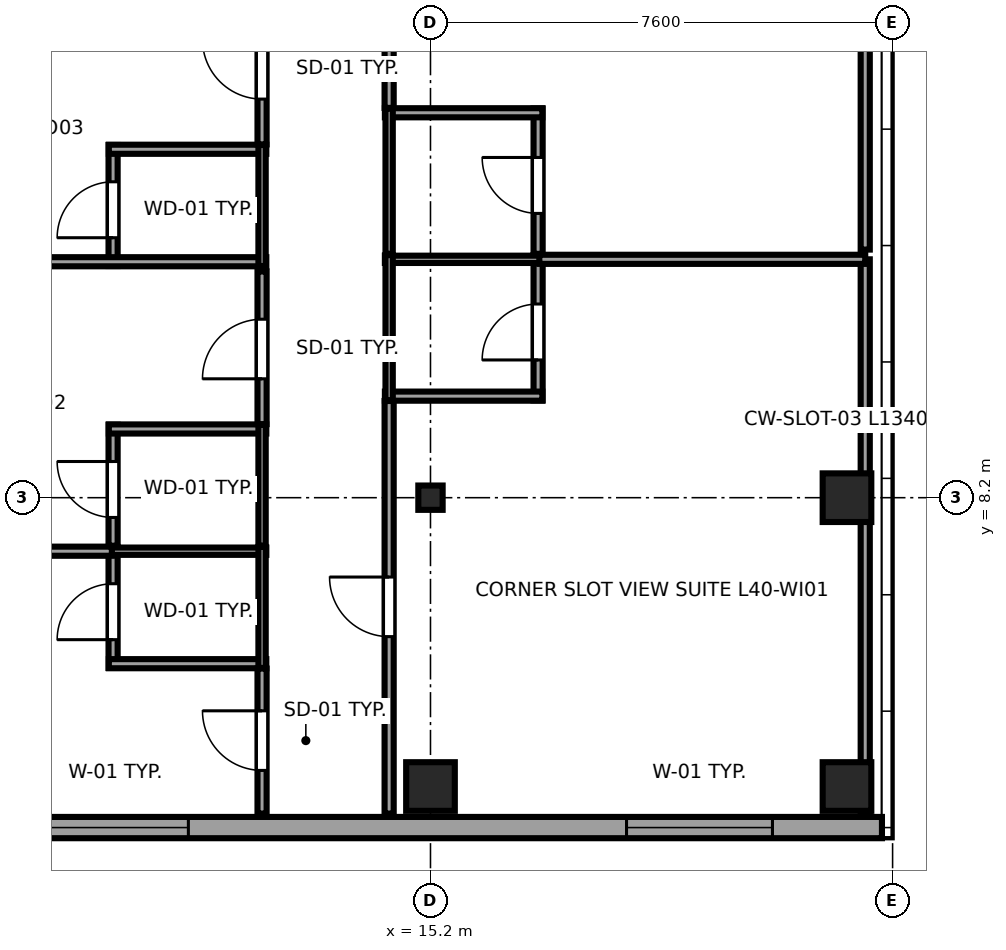
"""IFC4 building model, lengths in metres.
Left out: names, types, materials, properties, quantities, classifications, styles, units other than length and angle.
Written with IfcOpenShell. Run it as: python <this file> out.ifc"""

import sys

from ifc_helpers import new_model, si_unit, direction, frame, frame_2d, origin, origin_2d, place, context, subcontext, project, spatial, rectangle, i_section, extrude, source, transform, mapped, element, fill, save


model = new_model("IFC4")
c1 = context("Model", 3, precision=1e-05, world=origin(), true_north=direction((0.0, 1.0)))
c2 = subcontext(c1, "Body", "Model", "MODEL_VIEW")
j1 = project(units=[si_unit("LENGTHUNIT", "METRE"), si_unit("PLANEANGLEUNIT", "RADIAN")], contexts=[c1])
p1 = place(None, origin())
s1 = spatial("IfcSite", under=j1, at=p1, CompositionType="ELEMENT")
p2 = place(p1, origin())
s2 = spatial("IfcBuilding", under=s1, at=p2, CompositionType="ELEMENT")
p3 = place(p2, frame((0.0, 0.0, 154.15)))
s3 = spatial("IfcBuildingStorey", under=s2, at=p3, CompositionType="ELEMENT", Elevation=154.15)
m1 = source(origin(), c2, "Body", "SweptSolid", [
    extrude(rectangle(XDim=0.8, YDim=0.8, at=origin_2d()), origin(), (0.0, 0.0, 1.0), 3.55),
])
p4 = place(p3, frame((15.2, 3.45, 0.0), z_axis=(0.0, 0.0, 1.0), x_axis=(1.0, 0.0, 0.0)))
e1 = element("IfcColumn", 1, at=p4, inside=s3, PredefinedType="COLUMN", context=c2, shape_type="MappedRepresentation", body=[
    mapped(m1, transform((0.0, 0.0, 0.0), x_axis=(1.0, 0.0, 0.0), y_axis=(0.0, 1.0, 0.0), z_axis=(0.0, 0.0, 1.0), scale=1.0)),
])
m2 = source(origin(), c2, "Body", "SweptSolid", [
    extrude(i_section(OverallWidth=0.4, OverallDepth=0.4, WebThickness=0.02, FlangeThickness=0.035, at=origin_2d()), origin(), (0.0, 0.0, 1.0), 3.55),
])
p5 = place(p3, frame((15.2, 8.2, 0.0), z_axis=(0.0, 0.0, 1.0), x_axis=(1.0, 0.0, 0.0)))
e2 = element("IfcColumn", 2, at=p5, inside=s3, PredefinedType="COLUMN", context=c2, shape_type="MappedRepresentation", body=[
    mapped(m2, transform((0.0, 0.0, 0.0), x_axis=(1.0, 0.0, 0.0), y_axis=(0.0, 1.0, 0.0), z_axis=(0.0, 0.0, 1.0), scale=1.0)),
])
for number, where, z_axis, x_axis in (
    (3, (22.05, 3.45, 0.0), (0.0, 0.0, 1.0), (1.0, 0.0, 0.0)),
    (4, (22.05, 8.2, 0.0), (0.0, 0.0, 1.0), (1.0, 0.0, 0.0)),
):
    element("IfcColumn", number, at=place(p3, frame(where, z_axis=z_axis, x_axis=x_axis)), inside=s3, PredefinedType="COLUMN", context=c2, shape_type="MappedRepresentation", body=[
        mapped(m1, transform((0.0, 0.0, 0.0), x_axis=(1.0, 0.0, 0.0), y_axis=(0.0, 1.0, 0.0), z_axis=(0.0, 0.0, 1.0), scale=1.0)),
    ])
p6 = place(p3, frame((7.017, 2.775, 0.0), z_axis=(0.0, 0.0, 1.0), x_axis=(1.0, 0.0, 0.0)))
e5 = element("IfcWall", 5, at=p6, inside=s3, PredefinedType="SOLIDWALL", context=c2, shape_type="SweptSolid", body=[
    extrude(rectangle(XDim=15.608, YDim=0.35, at=frame_2d((7.804, 0.0))), origin(), (0.0, 0.0, 1.0), 3.37),
])
p7 = place(p6, frame((1.801, 0.0, 0.68)))
e6 = element("IfcOpeningElement", 6, at=p7, cuts=e5, PredefinedType="OPENING", context=c2, shape_type="SweptSolid", body=[
    extrude(rectangle(XDim=2.4, YDim=1.9, at=frame_2d((1.2, 0.95))), frame((0.0, 0.185, 0.0), z_axis=(0.0, -1.0, 0.0), x_axis=(1.0, 0.0, 0.0)), (0.0, 0.0, 1.0), 0.37),
])
p8 = place(p6, frame((11.407, 0.0, 0.68)))
e7 = element("IfcOpeningElement", 7, at=p8, cuts=e5, PredefinedType="OPENING", context=c2, shape_type="SweptSolid", body=[
    extrude(rectangle(XDim=2.4, YDim=1.9, at=frame_2d((1.2, 0.95))), frame((0.0, 0.185, 0.0), z_axis=(0.0, -1.0, 0.0), x_axis=(1.0, 0.0, 0.0)), (0.0, 0.0, 1.0), 0.37),
])
p9 = place(p3, frame((9.98, 5.4, 0.0), z_axis=(0.0, 0.0, 1.0), x_axis=(0.0, 1.0, 0.0)))
e8 = element("IfcWall", 8, at=p9, inside=s3, PredefinedType="PARTITIONING", context=c2, shape_type="SweptSolid", body=[
    extrude(rectangle(XDim=1.99, YDim=0.15, at=frame_2d((0.995, 0.0))), origin(), (0.0, 0.0, 1.0), 3.37),
])
p10 = place(p9, frame((0.465, 0.0, 0.0)))
e9 = element("IfcOpeningElement", 9, at=p10, cuts=e8, PredefinedType="OPENING", context=c2, shape_type="SweptSolid", body=[
    extrude(rectangle(XDim=0.92, YDim=2.01, at=frame_2d((0.46, 1.005))), frame((0.0, 0.085, 0.0), z_axis=(0.0, -1.0, 0.0), x_axis=(1.0, 0.0, 0.0)), (0.0, 0.0, 1.0), 0.17),
])
p11 = place(p3, frame((9.91, 5.47, 0.0), z_axis=(0.0, 0.0, 1.0), x_axis=(1.0, 0.0, 0.0)))
e10 = element("IfcWall", 10, at=p11, inside=s3, PredefinedType="PARTITIONING", context=c2, shape_type="SweptSolid", body=[
    extrude(rectangle(XDim=2.59, YDim=0.15, at=frame_2d((1.295, 0.0))), origin(), (0.0, 0.0, 1.0), 3.37),
])
p12 = place(p3, frame((9.91, 7.32, 0.0), z_axis=(0.0, 0.0, 1.0), x_axis=(1.0, 0.0, 0.0)))
e11 = element("IfcWall", 11, at=p12, inside=s3, PredefinedType="PLUMBINGWALL", context=c2, shape_type="SweptSolid", body=[
    extrude(rectangle(XDim=2.59, YDim=0.12, at=frame_2d((1.295, 0.0))), origin(), (0.0, 0.0, 1.0), 3.37),
])
p13 = place(p3, frame((12.43, 5.4, 0.0), z_axis=(0.0, 0.0, 1.0), x_axis=(0.0, 1.0, 0.0)))
e12 = element("IfcWall", 12, at=p13, inside=s3, PredefinedType="PLUMBINGWALL", context=c2, shape_type="SweptSolid", body=[
    extrude(rectangle(XDim=1.99, YDim=0.12, at=frame_2d((0.995, 0.0))), origin(), (0.0, 0.0, 1.0), 3.37),
])
p14 = place(p3, frame((9.98, 7.41, 0.0), z_axis=(0.0, 0.0, 1.0), x_axis=(0.0, 1.0, 0.0)))
e13 = element("IfcWall", 13, at=p14, inside=s3, PredefinedType="PARTITIONING", context=c2, shape_type="SweptSolid", body=[
    extrude(rectangle(XDim=1.99, YDim=0.15, at=frame_2d((0.995, 0.0))), origin(), (0.0, 0.0, 1.0), 3.37),
])
p15 = place(p14, frame((0.465, 0.0, 0.0)))
e14 = element("IfcOpeningElement", 14, at=p15, cuts=e13, PredefinedType="OPENING", context=c2, shape_type="SweptSolid", body=[
    extrude(rectangle(XDim=0.92, YDim=2.01, at=frame_2d((0.46, 1.005))), frame((0.0, 0.085, 0.0), z_axis=(0.0, -1.0, 0.0), x_axis=(1.0, 0.0, 0.0)), (0.0, 0.0, 1.0), 0.17),
])
p16 = place(p3, frame((9.91, 9.33, 0.0), z_axis=(0.0, 0.0, 1.0), x_axis=(1.0, 0.0, 0.0)))
e15 = element("IfcWall", 15, at=p16, inside=s3, PredefinedType="PARTITIONING", context=c2, shape_type="SweptSolid", body=[
    extrude(rectangle(XDim=2.59, YDim=0.15, at=frame_2d((1.295, 0.0))), origin(), (0.0, 0.0, 1.0), 3.37),
])
p17 = place(p3, frame((12.43, 7.41, 0.0), z_axis=(0.0, 0.0, 1.0), x_axis=(0.0, 1.0, 0.0)))
e16 = element("IfcWall", 16, at=p17, inside=s3, PredefinedType="PLUMBINGWALL", context=c2, shape_type="SweptSolid", body=[
    extrude(rectangle(XDim=1.99, YDim=0.12, at=frame_2d((0.995, 0.0))), origin(), (0.0, 0.0, 1.0), 3.37),
])
p18 = place(p3, frame((9.98, 12.01, 0.0), z_axis=(0.0, 0.0, 1.0), x_axis=(0.0, 1.0, 0.0)))
e17 = element("IfcWall", 17, at=p18, inside=s3, PredefinedType="PARTITIONING", context=c2, shape_type="SweptSolid", body=[
    extrude(rectangle(XDim=1.99, YDim=0.15, at=frame_2d((0.995, 0.0))), origin(), (0.0, 0.0, 1.0), 3.37),
])
p19 = place(p18, frame((0.465, 0.0, 0.0)))
e18 = element("IfcOpeningElement", 18, at=p19, cuts=e17, PredefinedType="OPENING", context=c2, shape_type="SweptSolid", body=[
    extrude(rectangle(XDim=0.92, YDim=2.01, at=frame_2d((0.46, 1.005))), frame((0.0, 0.085, 0.0), z_axis=(0.0, -1.0, 0.0), x_axis=(1.0, 0.0, 0.0)), (0.0, 0.0, 1.0), 0.17),
])
p20 = place(p3, frame((2.9, 12.08, 0.0), z_axis=(0.0, 0.0, 1.0), x_axis=(1.0, 0.0, 0.0)))
e19 = element("IfcWall", 19, at=p20, inside=s3, PredefinedType="PARTITIONING", context=c2, shape_type="SweptSolid", body=[
    extrude(rectangle(XDim=9.6, YDim=0.15, at=frame_2d((4.8, 0.0))), origin(), (0.0, 0.0, 1.0), 3.37),
])
p21 = place(p3, frame((9.91, 13.93, 0.0), z_axis=(0.0, 0.0, 1.0), x_axis=(1.0, 0.0, 0.0)))
e20 = element("IfcWall", 20, at=p21, inside=s3, PredefinedType="PARTITIONING", context=c2, shape_type="SweptSolid", body=[
    extrude(rectangle(XDim=2.59, YDim=0.15, at=frame_2d((1.295, 0.0))), origin(), (0.0, 0.0, 1.0), 3.37),
])
p22 = place(p3, frame((12.43, 12.01, 0.0), z_axis=(0.0, 0.0, 1.0), x_axis=(0.0, 1.0, 0.0)))
e21 = element("IfcWall", 21, at=p22, inside=s3, PredefinedType="PLUMBINGWALL", context=c2, shape_type="SweptSolid", body=[
    extrude(rectangle(XDim=1.99, YDim=0.12, at=frame_2d((0.995, 0.0))), origin(), (0.0, 0.0, 1.0), 3.37),
])
p23 = place(p3, frame((16.97, 9.8, 0.0), z_axis=(0.0, 0.0, 1.0), x_axis=(0.0, 1.0, 0.0)))
e22 = element("IfcWall", 22, at=p23, inside=s3, PredefinedType="PARTITIONING", context=c2, shape_type="SweptSolid", body=[
    extrude(rectangle(XDim=2.39, YDim=0.15, at=frame_2d((1.195, 0.0))), origin(), (0.0, 0.0, 1.0), 3.37),
])
p24 = place(p23, frame((0.665, 0.0, 0.0)))
e23 = element("IfcOpeningElement", 23, at=p24, cuts=e22, PredefinedType="OPENING", context=c2, shape_type="SweptSolid", body=[
    extrude(rectangle(XDim=0.92, YDim=2.01, at=frame_2d((0.46, 1.005))), frame((0.0, 0.085, 0.0), z_axis=(0.0, -1.0, 0.0), x_axis=(1.0, 0.0, 0.0)), (0.0, 0.0, 1.0), 0.17),
])
p25 = place(p3, frame((14.45, 9.87, 0.0), z_axis=(0.0, 0.0, 1.0), x_axis=(1.0, 0.0, 0.0)))
e24 = element("IfcWall", 24, at=p25, inside=s3, PredefinedType="PARTITIONING", context=c2, shape_type="SweptSolid", body=[
    extrude(rectangle(XDim=2.59, YDim=0.15, at=frame_2d((1.295, 0.0))), origin(), (0.0, 0.0, 1.0), 3.37),
])
p26 = place(p3, frame((14.45, 12.12, 0.0), z_axis=(0.0, 0.0, 1.0), x_axis=(1.0, 0.0, 0.0)))
e25 = element("IfcWall", 25, at=p26, inside=s3, PredefinedType="PLUMBINGWALL", context=c2, shape_type="SweptSolid", body=[
    extrude(rectangle(XDim=2.59, YDim=0.12, at=frame_2d((1.295, 0.0))), origin(), (0.0, 0.0, 1.0), 3.37),
])
p27 = place(p3, frame((14.52, 9.8, 0.0), z_axis=(0.0, 0.0, 1.0), x_axis=(0.0, 1.0, 0.0)))
e26 = element("IfcWall", 26, at=p27, inside=s3, PredefinedType="PLUMBINGWALL", context=c2, shape_type="SweptSolid", body=[
    extrude(rectangle(XDim=2.39, YDim=0.12, at=frame_2d((1.195, 0.0))), origin(), (0.0, 0.0, 1.0), 3.37),
])
p28 = place(p3, frame((16.97, 12.21, 0.0), z_axis=(0.0, 0.0, 1.0), x_axis=(0.0, 1.0, 0.0)))
e27 = element("IfcWall", 27, at=p28, inside=s3, PredefinedType="PARTITIONING", context=c2, shape_type="SweptSolid", body=[
    extrude(rectangle(XDim=2.39, YDim=0.15, at=frame_2d((1.195, 0.0))), origin(), (0.0, 0.0, 1.0), 3.37),
])
p29 = place(p28, frame((0.665, 0.0, 0.0)))
e28 = element("IfcOpeningElement", 28, at=p29, cuts=e27, PredefinedType="OPENING", context=c2, shape_type="SweptSolid", body=[
    extrude(rectangle(XDim=0.92, YDim=2.01, at=frame_2d((0.46, 1.005))), frame((0.0, 0.085, 0.0), z_axis=(0.0, -1.0, 0.0), x_axis=(1.0, 0.0, 0.0)), (0.0, 0.0, 1.0), 0.17),
])
p30 = place(p3, frame((14.45, 14.53, 0.0), z_axis=(0.0, 0.0, 1.0), x_axis=(1.0, 0.0, 0.0)))
e29 = element("IfcWall", 29, at=p30, inside=s3, PredefinedType="PARTITIONING", context=c2, shape_type="SweptSolid", body=[
    extrude(rectangle(XDim=2.59, YDim=0.15, at=frame_2d((1.295, 0.0))), origin(), (0.0, 0.0, 1.0), 3.37),
])
p31 = place(p3, frame((14.52, 12.21, 0.0), z_axis=(0.0, 0.0, 1.0), x_axis=(0.0, 1.0, 0.0)))
e30 = element("IfcWall", 30, at=p31, inside=s3, PredefinedType="PLUMBINGWALL", context=c2, shape_type="SweptSolid", body=[
    extrude(rectangle(XDim=2.39, YDim=0.12, at=frame_2d((1.195, 0.0))), origin(), (0.0, 0.0, 1.0), 3.37),
])
p32 = place(p3, frame((12.43, 3.005, 0.0), z_axis=(0.0, 0.0, 1.0), x_axis=(0.0, 1.0, 0.0)))
e31 = element("IfcWall", 31, at=p32, inside=s3, PredefinedType="PARTITIONING", context=c2, shape_type="SweptSolid", body=[
    extrude(rectangle(XDim=2.385, YDim=0.15, at=frame_2d((1.192, 0.0))), origin(), (0.0, 0.0, 1.0), 3.37),
])
p33 = place(p32, frame((0.71, 0.0, 0.0)))
e32 = element("IfcOpeningElement", 32, at=p33, cuts=e31, PredefinedType="OPENING", context=c2, shape_type="SweptSolid", body=[
    extrude(rectangle(XDim=0.98, YDim=2.12, at=frame_2d((0.49, 1.06))), frame((0.0, 0.085, 0.0), z_axis=(0.0, -1.0, 0.0), x_axis=(1.0, 0.0, 0.0)), (0.0, 0.0, 1.0), 0.17),
])
p34 = place(p3, frame((2.9, 7.32, 0.0), z_axis=(0.0, 0.0, 1.0), x_axis=(1.0, 0.0, 0.0)))
e33 = element("IfcWall", 33, at=p34, inside=s3, PredefinedType="PARTITIONING", context=c2, shape_type="SweptSolid", body=[
    extrude(rectangle(XDim=7.06, YDim=0.15, at=frame_2d((3.53, 0.0))), origin(), (0.0, 0.0, 1.0), 3.37),
])
p35 = place(p3, frame((12.43, 9.41, 0.0), z_axis=(0.0, 0.0, 1.0), x_axis=(0.0, 1.0, 0.0)))
e34 = element("IfcWall", 34, at=p35, inside=s3, PredefinedType="PARTITIONING", context=c2, shape_type="SweptSolid", body=[
    extrude(rectangle(XDim=2.51, YDim=0.15, at=frame_2d((1.255, 0.0))), origin(), (0.0, 0.0, 1.0), 3.37),
])
p36 = place(p35, frame((0.745, 0.0, 0.0)))
e35 = element("IfcOpeningElement", 35, at=p36, cuts=e34, PredefinedType="OPENING", context=c2, shape_type="SweptSolid", body=[
    extrude(rectangle(XDim=0.98, YDim=2.12, at=frame_2d((0.49, 1.06))), frame((0.0, 0.085, 0.0), z_axis=(0.0, -1.0, 0.0), x_axis=(1.0, 0.0, 0.0)), (0.0, 0.0, 1.0), 0.17),
])
p37 = place(p3, frame((12.43, 14.01, 0.0), z_axis=(0.0, 0.0, 1.0), x_axis=(0.0, 1.0, 0.0)))
e36 = element("IfcWall", 36, at=p37, inside=s3, PredefinedType="PARTITIONING", context=c2, shape_type="SweptSolid", body=[
    extrude(rectangle(XDim=2.51, YDim=0.15, at=frame_2d((1.255, 0.0))), origin(), (0.0, 0.0, 1.0), 3.37),
])
p38 = place(p37, frame((0.745, 0.0, 0.0)))
e37 = element("IfcOpeningElement", 37, at=p38, cuts=e36, PredefinedType="OPENING", context=c2, shape_type="SweptSolid", body=[
    extrude(rectangle(XDim=0.98, YDim=2.12, at=frame_2d((0.49, 1.06))), frame((0.0, 0.085, 0.0), z_axis=(0.0, -1.0, 0.0), x_axis=(1.0, 0.0, 0.0)), (0.0, 0.0, 1.0), 0.17),
])
p39 = place(p3, frame((14.52, 3.005, 0.0), z_axis=(0.0, 0.0, 1.0), x_axis=(0.0, 1.0, 0.0)))
e38 = element("IfcWall", 38, at=p39, inside=s3, PredefinedType="PARTITIONING", context=c2, shape_type="SweptSolid", body=[
    extrude(rectangle(XDim=6.785, YDim=0.15, at=frame_2d((3.393, 0.0))), origin(), (0.0, 0.0, 1.0), 3.37),
])
p40 = place(p39, frame((2.91, 0.0, 0.0)))
e39 = element("IfcOpeningElement", 39, at=p40, cuts=e38, PredefinedType="OPENING", context=c2, shape_type="SweptSolid", body=[
    extrude(rectangle(XDim=0.98, YDim=2.12, at=frame_2d((0.49, 1.06))), frame((0.0, 0.085, 0.0), z_axis=(0.0, -1.0, 0.0), x_axis=(1.0, 0.0, 0.0)), (0.0, 0.0, 1.0), 0.17),
])
p41 = place(p3, frame((22.35, 3.005, 0.0), z_axis=(0.0, 0.0, 1.0), x_axis=(0.0, 1.0, 0.0)))
e40 = element("IfcWall", 40, at=p41, inside=s3, PredefinedType="PARTITIONING", context=c2, shape_type="SweptSolid", body=[
    extrude(rectangle(XDim=9.115, YDim=0.15, at=frame_2d((4.558, 0.0))), origin(), (0.0, 0.0, 1.0), 3.37),
])
p42 = place(p3, frame((16.99, 12.12, 0.0), z_axis=(0.0, 0.0, 1.0), x_axis=(1.0, 0.0, 0.0)))
e41 = element("IfcWall", 41, at=p42, inside=s3, PredefinedType="PARTITIONING", context=c2, shape_type="SweptSolid", body=[
    extrude(rectangle(XDim=5.36, YDim=0.15, at=frame_2d((2.68, 0.0))), origin(), (0.0, 0.0, 1.0), 3.37),
])
p43 = place(p3, frame((14.52, 14.61, 0.0), z_axis=(0.0, 0.0, 1.0), x_axis=(0.0, 1.0, 0.0)))
e42 = element("IfcWall", 42, at=p43, inside=s3, PredefinedType="PARTITIONING", context=c2, shape_type="SweptSolid", body=[
    extrude(rectangle(XDim=6.61, YDim=0.15, at=frame_2d((3.305, 0.0))), origin(), (0.0, 0.0, 1.0), 3.37),
])
p44 = place(p43, frame((2.795, 0.0, 0.0)))
e43 = element("IfcOpeningElement", 43, at=p44, cuts=e42, PredefinedType="OPENING", context=c2, shape_type="SweptSolid", body=[
    extrude(rectangle(XDim=0.98, YDim=2.12, at=frame_2d((0.49, 1.06))), frame((0.0, 0.085, 0.0), z_axis=(0.0, -1.0, 0.0), x_axis=(1.0, 0.0, 0.0)), (0.0, 0.0, 1.0), 0.17),
])
p45 = place(p3, frame((22.35, 12.28, 0.0), z_axis=(0.0, 0.0, 1.0), x_axis=(0.0, 1.0, 0.0)))
e44 = element("IfcWall", 44, at=p45, inside=s3, PredefinedType="PARTITIONING", context=c2, shape_type="SweptSolid", body=[
    extrude(rectangle(XDim=8.94, YDim=0.15, at=frame_2d((4.47, 0.0))), origin(), (0.0, 0.0, 1.0), 3.37),
])
m3 = source(origin(), c2, "Body", "SweptSolid", [
    extrude(rectangle(XDim=2.4, YDim=1.9, at=frame_2d((1.2, 0.95))), frame((0.0, 0.09, 0.0), z_axis=(0.0, -1.0, 0.0), x_axis=(1.0, 0.0, 0.0)), (0.0, 0.0, 1.0), 0.06),
])
p46 = place(p7, origin())
e45 = element("IfcWindow", 45, at=p46, inside=s3, PartitioningType="TRIPLE_PANEL_HORIZONTAL", PredefinedType="WINDOW", context=c2, shape_type="MappedRepresentation", body=[
    mapped(m3, transform((0.0, 0.0, 0.0), x_axis=(1.0, 0.0, 0.0), y_axis=(0.0, 1.0, 0.0), z_axis=(0.0, 0.0, 1.0), scale=1.0)),
])
fill(e6, e45)
p47 = place(p8, origin())
e46 = element("IfcWindow", 46, at=p47, inside=s3, PartitioningType="TRIPLE_PANEL_HORIZONTAL", PredefinedType="WINDOW", context=c2, shape_type="MappedRepresentation", body=[
    mapped(m3, transform((0.0, 0.0, 0.0), x_axis=(1.0, 0.0, 0.0), y_axis=(0.0, 1.0, 0.0), z_axis=(0.0, 0.0, 1.0), scale=1.0)),
])
fill(e7, e46)
m4 = source(origin(), c2, "Body", "SweptSolid", [
    extrude(rectangle(XDim=0.92, YDim=2.01, at=frame_2d((0.46, 1.005))), frame((0.0, 0.025, 0.0), z_axis=(0.0, -1.0, 0.0), x_axis=(1.0, 0.0, 0.0)), (0.0, 0.0, 1.0), 0.05),
])
p48 = place(p10, origin())
e47 = element("IfcDoor", 47, at=p48, inside=s3, OperationType="SINGLE_SWING_LEFT", PredefinedType="DOOR", context=c2, shape_type="MappedRepresentation", body=[
    mapped(m4, transform((0.0, 0.0, 0.0), x_axis=(1.0, 0.0, 0.0), y_axis=(0.0, 1.0, 0.0), z_axis=(0.0, 0.0, 1.0), scale=1.0)),
])
fill(e9, e47)
p49 = place(p15, origin())
e48 = element("IfcDoor", 48, at=p49, inside=s3, OperationType="SINGLE_SWING_RIGHT", PredefinedType="DOOR", context=c2, shape_type="MappedRepresentation", body=[
    mapped(m4, transform((0.0, 0.0, 0.0), x_axis=(1.0, 0.0, 0.0), y_axis=(0.0, 1.0, 0.0), z_axis=(0.0, 0.0, 1.0), scale=1.0)),
])
fill(e14, e48)
p50 = place(p19, origin())
e49 = element("IfcDoor", 49, at=p50, inside=s3, OperationType="SINGLE_SWING_LEFT", PredefinedType="DOOR", context=c2, shape_type="MappedRepresentation", body=[
    mapped(m4, transform((0.0, 0.0, 0.0), x_axis=(1.0, 0.0, 0.0), y_axis=(0.0, 1.0, 0.0), z_axis=(0.0, 0.0, 1.0), scale=1.0)),
])
fill(e18, e49)
p51 = place(p24, origin())
e50 = element("IfcDoor", 50, at=p51, inside=s3, OperationType="SINGLE_SWING_LEFT", PredefinedType="DOOR", context=c2, shape_type="MappedRepresentation", body=[
    mapped(m4, transform((0.0, 0.0, 0.0), x_axis=(1.0, 0.0, 0.0), y_axis=(0.0, 1.0, 0.0), z_axis=(0.0, 0.0, 1.0), scale=1.0)),
])
fill(e23, e50)
p52 = place(p29, origin())
e51 = element("IfcDoor", 51, at=p52, inside=s3, OperationType="SINGLE_SWING_RIGHT", PredefinedType="DOOR", context=c2, shape_type="MappedRepresentation", body=[
    mapped(m4, transform((0.0, 0.0, 0.0), x_axis=(1.0, 0.0, 0.0), y_axis=(0.0, 1.0, 0.0), z_axis=(0.0, 0.0, 1.0), scale=1.0)),
])
fill(e28, e51)
m5 = source(origin(), c2, "Body", "SweptSolid", [
    extrude(rectangle(XDim=0.98, YDim=2.12, at=frame_2d((0.49, 1.06))), frame((0.0, 0.025, 0.0), z_axis=(0.0, -1.0, 0.0), x_axis=(1.0, 0.0, 0.0)), (0.0, 0.0, 1.0), 0.05),
])
p53 = place(p33, origin())
e52 = element("IfcDoor", 52, at=p53, inside=s3, OperationType="SINGLE_SWING_RIGHT", PredefinedType="DOOR", context=c2, shape_type="MappedRepresentation", body=[
    mapped(m5, transform((0.0, 0.0, 0.0), x_axis=(1.0, 0.0, 0.0), y_axis=(0.0, 1.0, 0.0), z_axis=(0.0, 0.0, 1.0), scale=1.0)),
])
fill(e32, e52)
p54 = place(p36, origin())
e53 = element("IfcDoor", 53, at=p54, inside=s3, OperationType="SINGLE_SWING_LEFT", PredefinedType="DOOR", context=c2, shape_type="MappedRepresentation", body=[
    mapped(m5, transform((0.0, 0.0, 0.0), x_axis=(1.0, 0.0, 0.0), y_axis=(0.0, 1.0, 0.0), z_axis=(0.0, 0.0, 1.0), scale=1.0)),
])
fill(e35, e53)
p55 = place(p38, origin())
e54 = element("IfcDoor", 54, at=p55, inside=s3, OperationType="SINGLE_SWING_RIGHT", PredefinedType="DOOR", context=c2, shape_type="MappedRepresentation", body=[
    mapped(m5, transform((0.0, 0.0, 0.0), x_axis=(1.0, 0.0, 0.0), y_axis=(0.0, 1.0, 0.0), z_axis=(0.0, 0.0, 1.0), scale=1.0)),
])
fill(e37, e54)
p56 = place(p40, origin())
e55 = element("IfcDoor", 55, at=p56, inside=s3, OperationType="SINGLE_SWING_RIGHT", PredefinedType="DOOR", context=c2, shape_type="MappedRepresentation", body=[
    mapped(m5, transform((0.0, 0.0, 0.0), x_axis=(1.0, 0.0, 0.0), y_axis=(0.0, 1.0, 0.0), z_axis=(0.0, 0.0, 1.0), scale=1.0)),
])
fill(e39, e55)
save(model, sys.argv[1])
